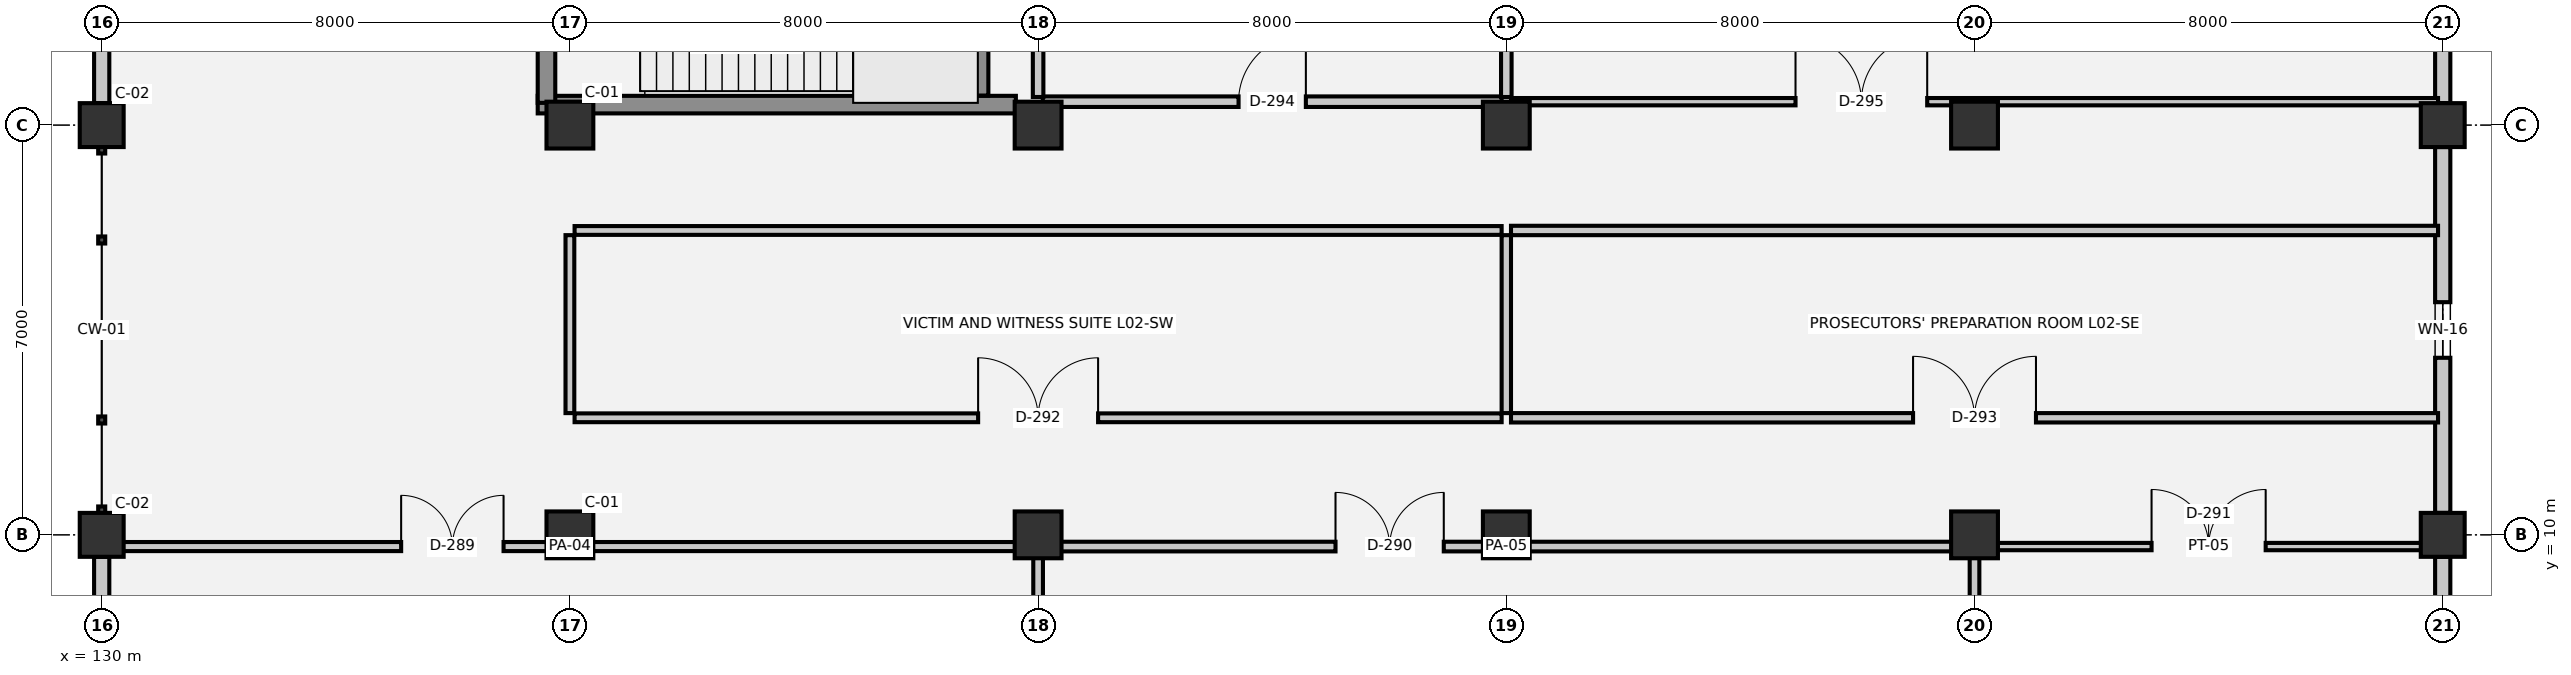
"""IFC4 building model, lengths in metres.
Left out: names, types, materials, properties, quantities, classifications, styles, units other than length and angle.
Written with IfcOpenShell. Run it as: python <this file> out.ifc"""

import sys

from ifc_helpers import new_model, si_unit, direction, frame, frame_2d, origin, origin_2d, place, context, subcontext, project, spatial, rectangle, extrude, element, fill, save


model = new_model("IFC4")
c1 = context("Model", 3, precision=1e-05, world=origin(), true_north=direction((0.0, 1.0)))
c2 = subcontext(c1, "Body", "Model", "MODEL_VIEW")
j1 = project(units=[si_unit("LENGTHUNIT", "METRE"), si_unit("PLANEANGLEUNIT", "RADIAN")], contexts=[c1])
p1 = place(None, origin())
s1 = spatial("IfcSite", under=j1, at=p1, CompositionType="ELEMENT")
p2 = place(p1, origin())
s2 = spatial("IfcBuilding", under=s1, at=p2, CompositionType="ELEMENT")
p3 = place(p2, frame((0.0, 0.0, 5.4)))
s3 = spatial("IfcBuildingStorey", under=s2, at=p3, CompositionType="ELEMENT", Elevation=5.4)
for number, where, z_axis, x_axis in (
    (1, (130.0, 10.0, 0.0), (0.0, 0.0, 1.0), (1.0, 0.0, 0.0)),
    (2, (130.0, 17.0, 0.0), (0.0, 0.0, 1.0), (1.0, 0.0, 0.0)),
):
    element("IfcColumn", number, at=place(p3, frame(where, z_axis=z_axis, x_axis=x_axis)), inside=s3, PredefinedType="COLUMN", context=c2, shape_type="SweptSolid", body=[
        extrude(rectangle(XDim=0.75, YDim=0.75, at=origin_2d()), origin(), (0.0, 0.0, 1.0), 4.5),
    ])
for number, where, z_axis, x_axis in (
    (3, (138.0, 10.0, 0.0), (0.0, 0.0, 1.0), (1.0, 0.0, 0.0)),
    (4, (138.0, 17.0, 0.0), (0.0, 0.0, 1.0), (1.0, 0.0, 0.0)),
    (5, (146.0, 10.0, 0.0), (0.0, 0.0, 1.0), (1.0, 0.0, 0.0)),
    (6, (146.0, 17.0, 0.0), (0.0, 0.0, 1.0), (1.0, 0.0, 0.0)),
    (7, (154.0, 10.0, 0.0), (0.0, 0.0, 1.0), (1.0, 0.0, 0.0)),
    (8, (154.0, 17.0, 0.0), (0.0, 0.0, 1.0), (1.0, 0.0, 0.0)),
    (9, (162.0, 10.0, 0.0), (0.0, 0.0, 1.0), (1.0, 0.0, 0.0)),
    (10, (162.0, 17.0, 0.0), (0.0, 0.0, 1.0), (1.0, 0.0, 0.0)),
):
    element("IfcColumn", number, at=place(p3, frame(where, z_axis=z_axis, x_axis=x_axis)), inside=s3, PredefinedType="COLUMN", context=c2, shape_type="SweptSolid", body=[
        extrude(rectangle(XDim=0.8, YDim=0.8, at=origin_2d()), origin(), (0.0, 0.0, 1.0), 4.5),
    ])
for number, where, z_axis, x_axis in (
    (11, (170.0, 10.0, 0.0), (0.0, 0.0, 1.0), (1.0, 0.0, 0.0)),
    (12, (170.0, 17.0, 0.0), (0.0, 0.0, 1.0), (1.0, 0.0, 0.0)),
):
    element("IfcColumn", number, at=place(p3, frame(where, z_axis=z_axis, x_axis=x_axis)), inside=s3, PredefinedType="COLUMN", context=c2, shape_type="SweptSolid", body=[
        extrude(rectangle(XDim=0.75, YDim=0.75, at=origin_2d()), origin(), (0.0, 0.0, 1.0), 4.5),
    ])
p4 = place(p3, frame((130.0, 4.375, 0.0), z_axis=(0.0, 0.0, 1.0), x_axis=(0.0, 1.0, 0.0)))
e13 = element("IfcWall", 13, at=p4, inside=s3, PredefinedType="SOLIDWALL", context=c2, shape_type="SweptSolid", body=[
    extrude(rectangle(XDim=5.25, YDim=0.26, at=frame_2d((2.625, 0.0))), origin(), (0.0, 0.0, 1.0), 3.23),
])
p5 = place(p4, frame((1.325, 0.0, 1.0)))
e14 = element("IfcOpeningElement", 14, at=p5, cuts=e13, PredefinedType="OPENING", context=c2, shape_type="SweptSolid", body=[
    extrude(rectangle(XDim=2.6, YDim=1.1, at=frame_2d((1.3, 0.55))), frame((0.0, 0.14, 0.0), z_axis=(0.0, -1.0, 0.0), x_axis=(1.0, 0.0, 0.0)), (0.0, 0.0, 1.0), 0.28),
])
p6 = place(p3, frame((130.0, 17.375, 0.0), z_axis=(0.0, 0.0, 1.0), x_axis=(0.0, 1.0, 0.0)))
e15 = element("IfcWall", 15, at=p6, inside=s3, PredefinedType="SOLIDWALL", context=c2, shape_type="SweptSolid", body=[
    extrude(rectangle(XDim=7.25, YDim=0.26, at=frame_2d((3.625, 0.0))), origin(), (0.0, 0.0, 1.0), 3.23),
])
p7 = place(p6, frame((2.7, 0.0, 0.0)))
e16 = element("IfcOpeningElement", 16, at=p7, cuts=e15, PredefinedType="OPENING", context=c2, shape_type="SweptSolid", body=[
    extrude(rectangle(XDim=1.65, YDim=2.2, at=frame_2d((0.825, 1.1))), frame((0.0, 0.14, 0.0), z_axis=(0.0, -1.0, 0.0), x_axis=(1.0, 0.0, 0.0)), (0.0, 0.0, 1.0), 0.28),
])
p8 = place(p3, frame((170.0, 24.625, 0.0), z_axis=(0.0, 0.0, 1.0), x_axis=(0.0, -1.0, 0.0)))
e17 = element("IfcWall", 17, at=p8, inside=s3, PredefinedType="SOLIDWALL", context=c2, shape_type="SweptSolid", body=[
    extrude(rectangle(XDim=7.25, YDim=0.26, at=frame_2d((3.625, 0.0))), origin(), (0.0, 0.0, 1.0), 3.23),
])
p9 = place(p8, frame((3.15, 0.0, 1.0)))
e18 = element("IfcOpeningElement", 18, at=p9, cuts=e17, PredefinedType="OPENING", context=c2, shape_type="SweptSolid", body=[
    extrude(rectangle(XDim=0.95, YDim=1.1, at=frame_2d((0.475, 0.55))), frame((0.0, 0.14, 0.0), z_axis=(0.0, -1.0, 0.0), x_axis=(1.0, 0.0, 0.0)), (0.0, 0.0, 1.0), 0.28),
])
p10 = place(p3, frame((170.0, 16.625, 0.0), z_axis=(0.0, 0.0, 1.0), x_axis=(0.0, -1.0, 0.0)))
e19 = element("IfcWall", 19, at=p10, inside=s3, PredefinedType="SOLIDWALL", context=c2, shape_type="SweptSolid", body=[
    extrude(rectangle(XDim=6.25, YDim=0.26, at=frame_2d((3.125, 0.0))), origin(), (0.0, 0.0, 1.0), 3.23),
])
p11 = place(p10, frame((2.65, 0.0, 1.0)))
e20 = element("IfcOpeningElement", 20, at=p11, cuts=e19, PredefinedType="OPENING", context=c2, shape_type="SweptSolid", body=[
    extrude(rectangle(XDim=0.95, YDim=1.1, at=frame_2d((0.475, 0.55))), frame((0.0, 0.14, 0.0), z_axis=(0.0, -1.0, 0.0), x_axis=(1.0, 0.0, 0.0)), (0.0, 0.0, 1.0), 0.28),
])
p12 = place(p3, frame((170.0, 9.625, 0.0), z_axis=(0.0, 0.0, 1.0), x_axis=(0.0, -1.0, 0.0)))
e21 = element("IfcWall", 21, at=p12, inside=s3, PredefinedType="SOLIDWALL", context=c2, shape_type="SweptSolid", body=[
    extrude(rectangle(XDim=5.25, YDim=0.26, at=frame_2d((2.625, 0.0))), origin(), (0.0, 0.0, 1.0), 3.23),
])
p13 = place(p12, frame((2.15, 0.0, 1.0)))
e22 = element("IfcOpeningElement", 22, at=p13, cuts=e21, PredefinedType="OPENING", context=c2, shape_type="SweptSolid", body=[
    extrude(rectangle(XDim=0.95, YDim=1.1, at=frame_2d((0.475, 0.55))), frame((0.0, 0.14, 0.0), z_axis=(0.0, -1.0, 0.0), x_axis=(1.0, 0.0, 0.0)), (0.0, 0.0, 1.0), 0.28),
])
p14 = place(p3, frame((137.45, 17.35, 0.0), z_axis=(0.0, 0.0, 1.0), x_axis=(1.0, 0.0, 0.0)))
e23 = element("IfcWall", 23, at=p14, inside=s3, PredefinedType="SHEAR", context=c2, shape_type="SweptSolid", body=[
    extrude(rectangle(XDim=8.17, YDim=0.3, at=frame_2d((4.085, 0.0))), origin(), (0.0, 0.0, 1.0), 4.2),
])
p15 = place(p3, frame((137.6, 21.495, 0.0), z_axis=(0.0, 0.0, 1.0), x_axis=(0.0, -1.0, 0.0)))
e24 = element("IfcWall", 24, at=p15, inside=s3, PredefinedType="SHEAR", context=c2, shape_type="SweptSolid", body=[
    extrude(rectangle(XDim=4.115, YDim=0.3, at=frame_2d((2.058, 0.0))), origin(), (0.0, 0.0, 1.0), 4.2),
])
p16 = place(p3, frame((145.0, 17.505, 0.0), z_axis=(0.0, 0.0, 1.0), x_axis=(0.0, 1.0, 0.0)))
e25 = element("IfcWall", 25, at=p16, inside=s3, PredefinedType="SHEAR", context=c2, shape_type="SweptSolid", body=[
    extrude(rectangle(XDim=3.99, YDim=0.3, at=frame_2d((1.995, 0.0))), origin(), (0.0, 0.0, 1.0), 4.2),
])
p17 = place(p3, frame((130.08, 9.8, 0.0), z_axis=(0.0, 0.0, 1.0), x_axis=(1.0, 0.0, 0.0)))
e26 = element("IfcWall", 26, at=p17, inside=s3, PredefinedType="PARTITIONING", context=c2, shape_type="SweptSolid", body=[
    extrude(rectangle(XDim=15.84, YDim=0.155, at=frame_2d((7.92, 0.0))), origin(), (0.0, 0.0, 1.0), 3.45),
])
p18 = place(p17, frame((5.037, 0.0, 0.0)))
e27 = element("IfcOpeningElement", 27, at=p18, cuts=e26, PredefinedType="OPENING", context=c2, shape_type="SweptSolid", body=[
    extrude(rectangle(XDim=1.75, YDim=2.3, at=frame_2d((0.875, 1.15))), frame((0.0, 0.087, 0.0), z_axis=(0.0, -1.0, 0.0), x_axis=(1.0, 0.0, 0.0)), (0.0, 0.0, 1.0), 0.175),
])
p19 = place(p3, frame((146.08, 9.8, 0.0), z_axis=(0.0, 0.0, 1.0), x_axis=(1.0, 0.0, 0.0)))
e28 = element("IfcWall", 28, at=p19, inside=s3, PredefinedType="PARTITIONING", context=c2, shape_type="SweptSolid", body=[
    extrude(rectangle(XDim=15.84, YDim=0.165, at=frame_2d((7.92, 0.0))), origin(), (0.0, 0.0, 1.0), 3.45),
])
p20 = place(p19, frame((5.001, 0.0, 0.0)))
e29 = element("IfcOpeningElement", 29, at=p20, cuts=e28, PredefinedType="OPENING", context=c2, shape_type="SweptSolid", body=[
    extrude(rectangle(XDim=1.85, YDim=2.3, at=frame_2d((0.925, 1.15))), frame((0.0, 0.093, 0.0), z_axis=(0.0, -1.0, 0.0), x_axis=(1.0, 0.0, 0.0)), (0.0, 0.0, 1.0), 0.185),
])
p21 = place(p3, frame((162.08, 9.8, 0.0), z_axis=(0.0, 0.0, 1.0), x_axis=(1.0, 0.0, 0.0)))
e30 = element("IfcWall", 30, at=p21, inside=s3, PredefinedType="PARTITIONING", context=c2, shape_type="SweptSolid", body=[
    extrude(rectangle(XDim=7.84, YDim=0.125, at=frame_2d((3.92, 0.0))), origin(), (0.0, 0.0, 1.0), 3.45),
])
p22 = place(p21, frame((2.945, 0.0, 0.0)))
e31 = element("IfcOpeningElement", 31, at=p22, cuts=e30, PredefinedType="OPENING", context=c2, shape_type="SweptSolid", body=[
    extrude(rectangle(XDim=1.95, YDim=2.35, at=frame_2d((0.975, 1.175))), frame((0.0, 0.073, 0.0), z_axis=(0.0, -1.0, 0.0), x_axis=(1.0, 0.0, 0.0)), (0.0, 0.0, 1.0), 0.145),
])
p23 = place(p3, frame((138.08, 12.0, 0.0), z_axis=(0.0, 0.0, 1.0), x_axis=(1.0, 0.0, 0.0)))
e32 = element("IfcWall", 32, at=p23, inside=s3, PredefinedType="PARTITIONING", context=c2, shape_type="SweptSolid", body=[
    extrude(rectangle(XDim=15.84, YDim=0.15, at=frame_2d((7.92, 0.0))), origin(), (0.0, 0.0, 1.0), 4.14),
])
p24 = place(p23, frame((6.895, 0.0, 0.0)))
e33 = element("IfcOpeningElement", 33, at=p24, cuts=e32, PredefinedType="OPENING", context=c2, shape_type="SweptSolid", body=[
    extrude(rectangle(XDim=2.05, YDim=2.35, at=frame_2d((1.025, 1.175))), frame((0.0, 0.085, 0.0), z_axis=(0.0, -1.0, 0.0), x_axis=(1.0, 0.0, 0.0)), (0.0, 0.0, 1.0), 0.17),
])
p25 = place(p3, frame((154.08, 12.0, 0.0), z_axis=(0.0, 0.0, 1.0), x_axis=(1.0, 0.0, 0.0)))
e34 = element("IfcWall", 34, at=p25, inside=s3, PredefinedType="PARTITIONING", context=c2, shape_type="SweptSolid", body=[
    extrude(rectangle(XDim=15.84, YDim=0.16, at=frame_2d((7.92, 0.0))), origin(), (0.0, 0.0, 1.0), 4.14),
])
p26 = place(p25, frame((6.87, 0.0, 0.0)))
e35 = element("IfcOpeningElement", 35, at=p26, cuts=e34, PredefinedType="OPENING", context=c2, shape_type="SweptSolid", body=[
    extrude(rectangle(XDim=2.1, YDim=2.35, at=frame_2d((1.05, 1.175))), frame((0.0, 0.09, 0.0), z_axis=(0.0, -1.0, 0.0), x_axis=(1.0, 0.0, 0.0)), (0.0, 0.0, 1.0), 0.18),
])
p27 = place(p3, frame((138.08, 15.2, 0.0), z_axis=(0.0, 0.0, 1.0), x_axis=(1.0, 0.0, 0.0)))
e36 = element("IfcWall", 36, at=p27, inside=s3, PredefinedType="PARTITIONING", context=c2, shape_type="SweptSolid", body=[
    extrude(rectangle(XDim=15.84, YDim=0.15, at=frame_2d((7.92, 0.0))), origin(), (0.0, 0.0, 1.0), 4.14),
])
p28 = place(p3, frame((154.08, 15.2, 0.0), z_axis=(0.0, 0.0, 1.0), x_axis=(1.0, 0.0, 0.0)))
e37 = element("IfcWall", 37, at=p28, inside=s3, PredefinedType="PARTITIONING", context=c2, shape_type="SweptSolid", body=[
    extrude(rectangle(XDim=15.84, YDim=0.16, at=frame_2d((7.92, 0.0))), origin(), (0.0, 0.0, 1.0), 4.14),
])
p29 = place(p3, frame((146.08, 17.4, 0.0), z_axis=(0.0, 0.0, 1.0), x_axis=(1.0, 0.0, 0.0)))
e38 = element("IfcWall", 38, at=p29, inside=s3, PredefinedType="PARTITIONING", context=c2, shape_type="SweptSolid", body=[
    extrude(rectangle(XDim=7.84, YDim=0.18, at=frame_2d((3.92, 0.0))), origin(), (0.0, 0.0, 1.0), 4.14),
])
p30 = place(p29, frame((3.345, 0.0, 0.0)))
e39 = element("IfcOpeningElement", 39, at=p30, cuts=e38, PredefinedType="OPENING", context=c2, shape_type="SweptSolid", body=[
    extrude(rectangle(XDim=1.15, YDim=2.2, at=frame_2d((0.575, 1.1))), frame((0.0, 0.1, 0.0), z_axis=(0.0, -1.0, 0.0), x_axis=(1.0, 0.0, 0.0)), (0.0, 0.0, 1.0), 0.2),
])
p31 = place(p3, frame((154.08, 17.4, 0.0), z_axis=(0.0, 0.0, 1.0), x_axis=(1.0, 0.0, 0.0)))
e40 = element("IfcWall", 40, at=p31, inside=s3, PredefinedType="PARTITIONING", context=c2, shape_type="SweptSolid", body=[
    extrude(rectangle(XDim=15.84, YDim=0.125, at=frame_2d((7.92, 0.0))), origin(), (0.0, 0.0, 1.0), 4.14),
])
p32 = place(p31, frame((4.862, 0.0, 0.0)))
e41 = element("IfcOpeningElement", 41, at=p32, cuts=e40, PredefinedType="OPENING", context=c2, shape_type="SweptSolid", body=[
    extrude(rectangle(XDim=2.25, YDim=2.4, at=frame_2d((1.125, 1.2))), frame((0.0, 0.073, 0.0), z_axis=(0.0, -1.0, 0.0), x_axis=(1.0, 0.0, 0.0)), (0.0, 0.0, 1.0), 0.145),
])
p33 = place(p3, frame((138.0, 12.08, 0.0), z_axis=(0.0, 0.0, 1.0), x_axis=(0.0, 1.0, 0.0)))
e42 = element("IfcWall", 42, at=p33, inside=s3, PredefinedType="PARTITIONING", context=c2, shape_type="SweptSolid", body=[
    extrude(rectangle(XDim=3.04, YDim=0.15, at=frame_2d((1.52, 0.0))), origin(), (0.0, 0.0, 1.0), 3.55),
])
p34 = place(p3, frame((146.0, 4.08, 0.0), z_axis=(0.0, 0.0, 1.0), x_axis=(0.0, 1.0, 0.0)))
e43 = element("IfcWall", 43, at=p34, inside=s3, PredefinedType="PARTITIONING", context=c2, shape_type="SweptSolid", body=[
    extrude(rectangle(XDim=5.64, YDim=0.165, at=frame_2d((2.82, 0.0))), origin(), (0.0, 0.0, 1.0), 3.55),
])
p35 = place(p3, frame((146.0, 17.48, 0.0), z_axis=(0.0, 0.0, 1.0), x_axis=(0.0, 1.0, 0.0)))
e44 = element("IfcWall", 44, at=p35, inside=s3, PredefinedType="PARTITIONING", context=c2, shape_type="SweptSolid", body=[
    extrude(rectangle(XDim=7.44, YDim=0.18, at=frame_2d((3.72, 0.0))), origin(), (0.0, 0.0, 1.0), 3.3),
])
p36 = place(p3, frame((154.0, 12.08, 0.0), z_axis=(0.0, 0.0, 1.0), x_axis=(0.0, 1.0, 0.0)))
e45 = element("IfcWall", 45, at=p36, inside=s3, PredefinedType="PARTITIONING", context=c2, shape_type="SweptSolid", body=[
    extrude(rectangle(XDim=3.04, YDim=0.16, at=frame_2d((1.52, 0.0))), origin(), (0.0, 0.0, 1.0), 3.55),
])
p37 = place(p3, frame((154.0, 17.48, 0.0), z_axis=(0.0, 0.0, 1.0), x_axis=(0.0, 1.0, 0.0)))
e46 = element("IfcWall", 46, at=p37, inside=s3, PredefinedType="PARTITIONING", context=c2, shape_type="SweptSolid", body=[
    extrude(rectangle(XDim=7.12, YDim=0.18, at=frame_2d((3.56, 0.0))), origin(), (0.0, 0.0, 1.0), 3.3),
])
p38 = place(p3, frame((162.0, 4.08, 0.0), z_axis=(0.0, 0.0, 1.0), x_axis=(0.0, 1.0, 0.0)))
e47 = element("IfcWall", 47, at=p38, inside=s3, PredefinedType="PARTITIONING", context=c2, shape_type="SweptSolid", body=[
    extrude(rectangle(XDim=5.64, YDim=0.165, at=frame_2d((2.82, 0.0))), origin(), (0.0, 0.0, 1.0), 3.55),
])
p39 = place(p11, origin())
e48 = element("IfcWindow", 48, at=p39, inside=s3, PartitioningType="SINGLE_PANEL", PredefinedType="WINDOW", context=c2, shape_type="SweptSolid", body=[
    extrude(rectangle(XDim=0.95, YDim=1.1, at=frame_2d((0.475, 0.55))), frame((0.0, 0.03, 0.0), z_axis=(0.0, -1.0, 0.0), x_axis=(1.0, 0.0, 0.0)), (0.0, 0.0, 1.0), 0.06),
])
fill(e20, e48)
p40 = place(p18, origin())
e49 = element("IfcDoor", 49, at=p40, inside=s3, OperationType="DOUBLE_DOOR_SINGLE_SWING", PredefinedType="DOOR", context=c2, shape_type="SweptSolid", body=[
    extrude(rectangle(XDim=1.75, YDim=2.3, at=frame_2d((0.875, 1.15))), frame((0.0, 0.025, 0.0), z_axis=(0.0, -1.0, 0.0), x_axis=(1.0, 0.0, 0.0)), (0.0, 0.0, 1.0), 0.05),
])
fill(e27, e49)
p41 = place(p20, origin())
e50 = element("IfcDoor", 50, at=p41, inside=s3, OperationType="DOUBLE_DOOR_SINGLE_SWING", PredefinedType="DOOR", context=c2, shape_type="SweptSolid", body=[
    extrude(rectangle(XDim=1.85, YDim=2.3, at=frame_2d((0.925, 1.15))), frame((0.0, 0.025, 0.0), z_axis=(0.0, -1.0, 0.0), x_axis=(1.0, 0.0, 0.0)), (0.0, 0.0, 1.0), 0.05),
])
fill(e29, e50)
p42 = place(p22, origin())
e51 = element("IfcDoor", 51, at=p42, inside=s3, OperationType="DOUBLE_DOOR_SINGLE_SWING", PredefinedType="DOOR", context=c2, shape_type="SweptSolid", body=[
    extrude(rectangle(XDim=1.95, YDim=2.35, at=frame_2d((0.975, 1.175))), frame((0.0, 0.025, 0.0), z_axis=(0.0, -1.0, 0.0), x_axis=(1.0, 0.0, 0.0)), (0.0, 0.0, 1.0), 0.05),
])
fill(e31, e51)
p43 = place(p24, origin())
e52 = element("IfcDoor", 52, at=p43, inside=s3, OperationType="DOUBLE_DOOR_SINGLE_SWING", PredefinedType="DOOR", context=c2, shape_type="SweptSolid", body=[
    extrude(rectangle(XDim=2.05, YDim=2.35, at=frame_2d((1.025, 1.175))), frame((0.0, 0.025, 0.0), z_axis=(0.0, -1.0, 0.0), x_axis=(1.0, 0.0, 0.0)), (0.0, 0.0, 1.0), 0.05),
])
fill(e33, e52)
p44 = place(p26, origin())
e53 = element("IfcDoor", 53, at=p44, inside=s3, OperationType="DOUBLE_DOOR_SINGLE_SWING", PredefinedType="DOOR", context=c2, shape_type="SweptSolid", body=[
    extrude(rectangle(XDim=2.1, YDim=2.35, at=frame_2d((1.05, 1.175))), frame((0.0, 0.025, 0.0), z_axis=(0.0, -1.0, 0.0), x_axis=(1.0, 0.0, 0.0)), (0.0, 0.0, 1.0), 0.05),
])
fill(e35, e53)
p45 = place(p30, origin())
e54 = element("IfcDoor", 54, at=p45, inside=s3, OperationType="SINGLE_SWING_RIGHT", PredefinedType="DOOR", context=c2, shape_type="SweptSolid", body=[
    extrude(rectangle(XDim=1.15, YDim=2.2, at=frame_2d((0.575, 1.1))), frame((0.0, 0.025, 0.0), z_axis=(0.0, -1.0, 0.0), x_axis=(1.0, 0.0, 0.0)), (0.0, 0.0, 1.0), 0.05),
])
fill(e39, e54)
p46 = place(p32, origin())
e55 = element("IfcDoor", 55, at=p46, inside=s3, OperationType="DOUBLE_DOOR_SINGLE_SWING", PredefinedType="DOOR", context=c2, shape_type="SweptSolid", body=[
    extrude(rectangle(XDim=2.25, YDim=2.4, at=frame_2d((1.125, 1.2))), frame((0.0, 0.025, 0.0), z_axis=(0.0, -1.0, 0.0), x_axis=(1.0, 0.0, 0.0)), (0.0, 0.0, 1.0), 0.05),
])
fill(e41, e55)
save(model, sys.argv[1])
